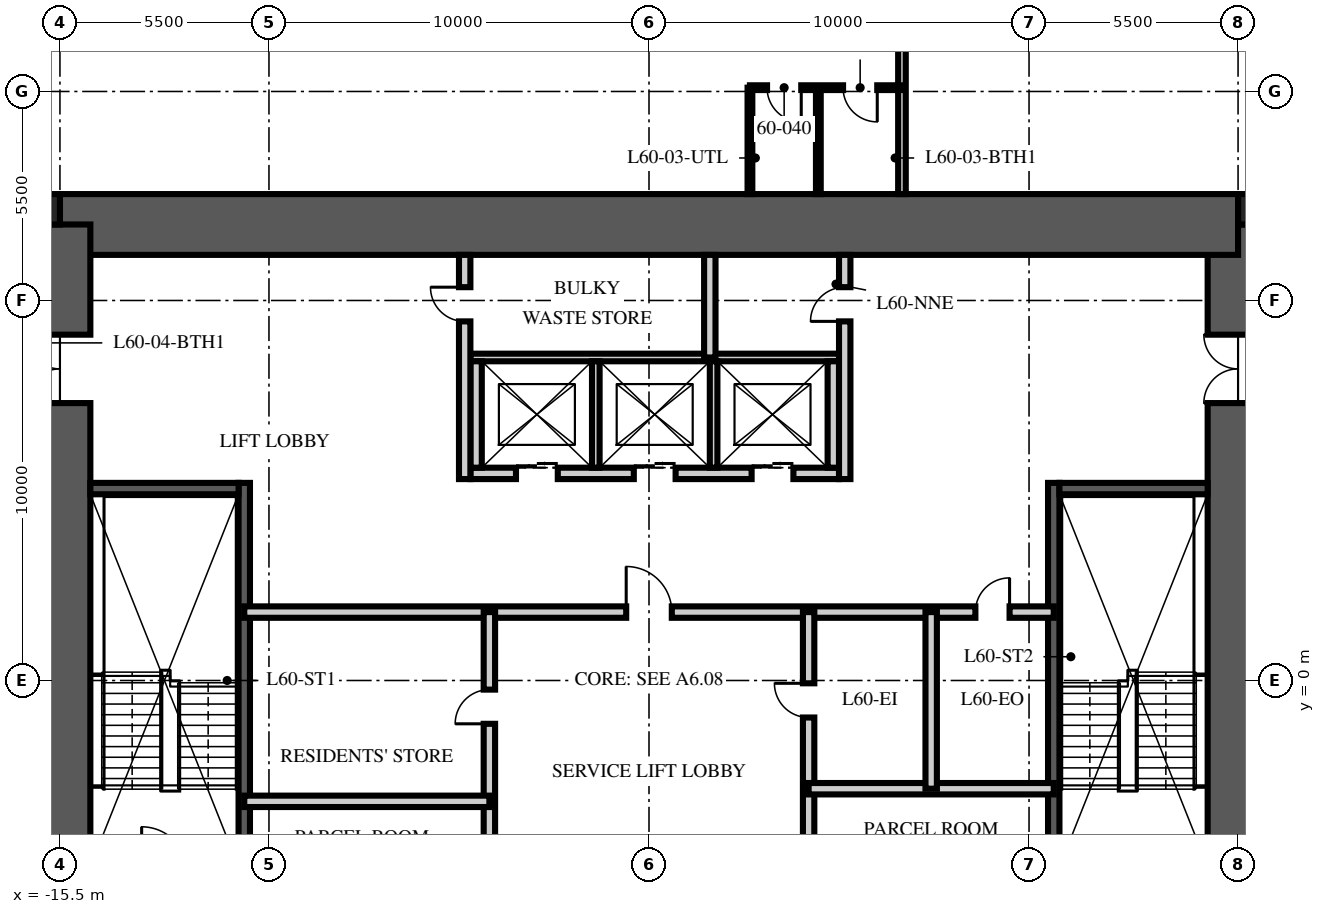
"""IFC4 building model, lengths in metres.
Left out: names, types, materials, properties, quantities, classifications, styles, units other than length and angle.
Written with IfcOpenShell. Run it as: python <this file> out.ifc"""

import sys

from ifc_helpers import new_model, si_unit, direction, frame, frame_2d, origin, origin_2d, place, context, subcontext, project, spatial, rectangle, extrude, element, fill, save


model = new_model("IFC4")
c1 = context("Model", 3, precision=1e-05, world=origin(), true_north=direction((0.0, 1.0)))
c2 = subcontext(c1, "Body", "Model", "MODEL_VIEW")
j1 = project(units=[si_unit("LENGTHUNIT", "METRE"), si_unit("PLANEANGLEUNIT", "RADIAN")], contexts=[c1])
p1 = place(None, origin())
s1 = spatial("IfcSite", under=j1, at=p1, CompositionType="ELEMENT")
p2 = place(p1, origin())
s2 = spatial("IfcBuilding", under=s1, at=p2, CompositionType="ELEMENT")
p3 = place(p2, frame((0.0, 0.0, 240.75)))
s3 = spatial("IfcBuildingStorey", under=s2, at=p3, CompositionType="ELEMENT", Elevation=240.75)
p4 = place(p3, frame((15.5, -12.0, -0.25), z_axis=(0.0, 0.0, 1.0), x_axis=(0.0, 1.0, 0.0)))
e1 = element("IfcWall", 1, at=p4, inside=s3, PredefinedType="SHEAR", context=c2, shape_type="SweptSolid", body=[
    extrude(rectangle(XDim=24.0, YDim=1.6, at=frame_2d((12.0, 0.0))), origin(), (0.0, 0.0, 1.0), 3.75),
])
p5 = place(p4, frame((3.2, 0.0, 0.25)))
e2 = element("IfcOpeningElement", 2, at=p5, cuts=e1, PredefinedType="OPENING", context=c2, shape_type="SweptSolid", body=[
    extrude(rectangle(XDim=1.2, YDim=2.1, at=frame_2d((0.6, 1.05))), frame((0.0, 0.81, 0.0), z_axis=(0.0, -1.0, 0.0), x_axis=(1.0, 0.0, 0.0)), (0.0, 0.0, 1.0), 1.62),
])
p6 = place(p4, frame((19.3, 0.0, 0.25)))
e3 = element("IfcOpeningElement", 3, at=p6, cuts=e1, PredefinedType="OPENING", context=c2, shape_type="SweptSolid", body=[
    extrude(rectangle(XDim=1.8, YDim=2.1, at=frame_2d((0.9, 1.05))), frame((0.0, 0.81, 0.0), z_axis=(0.0, -1.0, 0.0), x_axis=(1.0, 0.0, 0.0)), (0.0, 0.0, 1.0), 1.62),
])
p7 = place(p3, frame((-15.5, 12.0, -0.25), z_axis=(0.0, 0.0, 1.0), x_axis=(1.0, 0.0, 0.0)))
e4 = element("IfcWall", 4, at=p7, inside=s3, PredefinedType="SHEAR", context=c2, shape_type="SweptSolid", body=[
    extrude(rectangle(XDim=31.0, YDim=1.6, at=frame_2d((15.5, 0.0))), origin(), (0.0, 0.0, 1.0), 3.75),
])
p8 = place(p3, frame((-15.5, -12.0, -0.25), z_axis=(0.0, 0.0, 1.0), x_axis=(0.0, 1.0, 0.0)))
e5 = element("IfcWall", 5, at=p8, inside=s3, PredefinedType="SHEAR", context=c2, shape_type="SweptSolid", body=[
    extrude(rectangle(XDim=24.0, YDim=1.6, at=frame_2d((12.0, 0.0))), origin(), (0.0, 0.0, 1.0), 3.75),
])
p9 = place(p8, frame((3.2, 0.0, 0.25)))
e6 = element("IfcOpeningElement", 6, at=p9, cuts=e5, PredefinedType="OPENING", context=c2, shape_type="SweptSolid", body=[
    extrude(rectangle(XDim=1.2, YDim=2.1, at=frame_2d((0.6, 1.05))), frame((0.0, 0.81, 0.0), z_axis=(0.0, -1.0, 0.0), x_axis=(1.0, 0.0, 0.0)), (0.0, 0.0, 1.0), 1.62),
])
p10 = place(p8, frame((19.3, 0.0, 0.25)))
e7 = element("IfcOpeningElement", 7, at=p10, cuts=e5, PredefinedType="OPENING", context=c2, shape_type="SweptSolid", body=[
    extrude(rectangle(XDim=1.8, YDim=2.1, at=frame_2d((0.9, 1.05))), frame((0.0, 0.81, 0.0), z_axis=(0.0, -1.0, 0.0), x_axis=(1.0, 0.0, 0.0)), (0.0, 0.0, 1.0), 1.62),
])
for number, where, z_axis, x_axis in (
    (8, (15.9, 12.4, -0.25), (0.0, 0.0, 1.0), (1.0, 0.0, 0.0)),
    (9, (-15.9, 12.4, -0.25), (0.0, 0.0, 1.0), (1.0, 0.0, 0.0)),
):
    element("IfcColumn", number, at=place(p3, frame(where, z_axis=z_axis, x_axis=x_axis)), inside=s3, PredefinedType="COLUMN", context=c2, shape_type="SweptSolid", body=[
        extrude(rectangle(XDim=0.8, YDim=0.8, at=origin_2d()), origin(), (0.0, 0.0, 1.0), 3.75),
    ])
p11 = place(p3, frame((-10.65, -4.9, 0.0), z_axis=(0.0, 0.0, 1.0), x_axis=(0.0, 1.0, 0.0)))
e10 = element("IfcWall", 10, at=p11, inside=s3, PredefinedType="SOLIDWALL", context=c2, shape_type="SweptSolid", body=[
    extrude(rectangle(XDim=10.1, YDim=0.3, at=frame_2d((5.05, 0.0))), origin(), (0.0, 0.0, 1.0), 3.5),
])
p12 = place(p3, frame((-14.7, 5.05, 0.0), z_axis=(0.0, 0.0, 1.0), x_axis=(1.0, 0.0, 0.0)))
e11 = element("IfcWall", 11, at=p12, inside=s3, PredefinedType="SOLIDWALL", context=c2, shape_type="SweptSolid", body=[
    extrude(rectangle(XDim=3.9, YDim=0.3, at=frame_2d((1.95, 0.0))), origin(), (0.0, 0.0, 1.0), 3.5),
])
p13 = place(p3, frame((10.65, -4.9, 0.0), z_axis=(0.0, 0.0, 1.0), x_axis=(0.0, 1.0, 0.0)))
e12 = element("IfcWall", 12, at=p13, inside=s3, PredefinedType="SOLIDWALL", context=c2, shape_type="SweptSolid", body=[
    extrude(rectangle(XDim=10.1, YDim=0.3, at=frame_2d((5.05, 0.0))), origin(), (0.0, 0.0, 1.0), 3.5),
])
p14 = place(p3, frame((14.7, 5.05, 0.0), z_axis=(0.0, 0.0, 1.0), x_axis=(-1.0, 0.0, 0.0)))
e13 = element("IfcWall", 13, at=p14, inside=s3, PredefinedType="SOLIDWALL", context=c2, shape_type="SweptSolid", body=[
    extrude(rectangle(XDim=3.9, YDim=0.3, at=frame_2d((1.95, 0.0))), origin(), (0.0, 0.0, 1.0), 3.5),
])
p15 = place(p3, frame((-4.7, 5.45, 0.0), z_axis=(0.0, 0.0, 1.0), x_axis=(1.0, 0.0, 0.0)))
e14 = element("IfcWall", 14, at=p15, inside=s3, PredefinedType="PARTITIONING", context=c2, shape_type="SweptSolid", body=[
    extrude(rectangle(XDim=9.7, YDim=0.3, at=frame_2d((4.85, 0.0))), origin(), (0.0, 0.0, 1.0), 3.5),
])
p16 = place(p15, frame((1.2, 0.0, 0.0)))
e15 = element("IfcOpeningElement", 15, at=p16, cuts=e14, PredefinedType="OPENING", context=c2, shape_type="SweptSolid", body=[
    extrude(rectangle(XDim=1.1, YDim=2.1, at=frame_2d((0.55, 1.05))), frame((0.0, 0.16, 0.0), z_axis=(0.0, -1.0, 0.0), x_axis=(1.0, 0.0, 0.0)), (0.0, 0.0, 1.0), 0.32),
])
p17 = place(p15, frame((4.3, 0.0, 0.0)))
e16 = element("IfcOpeningElement", 16, at=p17, cuts=e14, PredefinedType="OPENING", context=c2, shape_type="SweptSolid", body=[
    extrude(rectangle(XDim=1.1, YDim=2.1, at=frame_2d((0.55, 1.05))), frame((0.0, 0.16, 0.0), z_axis=(0.0, -1.0, 0.0), x_axis=(1.0, 0.0, 0.0)), (0.0, 0.0, 1.0), 0.32),
])
p18 = place(p15, frame((7.4, 0.0, 0.0)))
e17 = element("IfcOpeningElement", 17, at=p18, cuts=e14, PredefinedType="OPENING", context=c2, shape_type="SweptSolid", body=[
    extrude(rectangle(XDim=1.1, YDim=2.1, at=frame_2d((0.55, 1.05))), frame((0.0, 0.16, 0.0), z_axis=(0.0, -1.0, 0.0), x_axis=(1.0, 0.0, 0.0)), (0.0, 0.0, 1.0), 0.32),
])
p19 = place(p3, frame((-4.7, 8.5, 0.0), z_axis=(0.0, 0.0, 1.0), x_axis=(1.0, 0.0, 0.0)))
e18 = element("IfcWall", 18, at=p19, inside=s3, PredefinedType="PARTITIONING", context=c2, shape_type="SweptSolid", body=[
    extrude(rectangle(XDim=9.7, YDim=0.2, at=frame_2d((4.85, 0.0))), origin(), (0.0, 0.0, 1.0), 3.5),
])
for number, where, z_axis, x_axis in (
    (19, (-4.55, 5.6, 0.0), (0.0, 0.0, 1.0), (0.0, 1.0, 0.0)),
    (20, (4.85, 5.6, 0.0), (0.0, 0.0, 1.0), (0.0, 1.0, 0.0)),
):
    element("IfcWall", number, at=place(p3, frame(where, z_axis=z_axis, x_axis=x_axis)), inside=s3, PredefinedType="PARTITIONING", context=c2, shape_type="SweptSolid", body=[
        extrude(rectangle(XDim=2.8, YDim=0.3, at=frame_2d((1.4, 0.0))), origin(), (0.0, 0.0, 1.0), 3.5),
    ])
for number, where, z_axis, x_axis in (
    (21, (-1.4, 5.6, 0.0), (0.0, 0.0, 1.0), (0.0, 1.0, 0.0)),
    (22, (1.7, 5.6, 0.0), (0.0, 0.0, 1.0), (0.0, 1.0, 0.0)),
):
    element("IfcWall", number, at=place(p3, frame(where, z_axis=z_axis, x_axis=x_axis)), inside=s3, PredefinedType="PARTITIONING", context=c2, shape_type="SweptSolid", body=[
        extrude(rectangle(XDim=2.8, YDim=0.2, at=frame_2d((1.4, 0.0))), origin(), (0.0, 0.0, 1.0), 3.5),
    ])
p20 = place(p3, frame((-10.65, 1.8, 0.0), z_axis=(0.0, 0.0, 1.0), x_axis=(1.0, 0.0, 0.0)))
e23 = element("IfcWall", 23, at=p20, inside=s3, PredefinedType="PARTITIONING", context=c2, shape_type="SweptSolid", body=[
    extrude(rectangle(XDim=21.3, YDim=0.3, at=frame_2d((10.65, 0.0))), origin(), (0.0, 0.0, 1.0), 3.5),
])
p21 = place(p20, frame((10.05, 0.0, 0.0)))
e24 = element("IfcOpeningElement", 24, at=p21, cuts=e23, PredefinedType="OPENING", context=c2, shape_type="SweptSolid", body=[
    extrude(rectangle(XDim=1.2, YDim=2.1, at=frame_2d((0.6, 1.05))), frame((0.0, 0.16, 0.0), z_axis=(0.0, -1.0, 0.0), x_axis=(1.0, 0.0, 0.0)), (0.0, 0.0, 1.0), 0.32),
])
p22 = place(p20, frame((19.238, 0.0, 0.0)))
e25 = element("IfcOpeningElement", 25, at=p22, cuts=e23, PredefinedType="OPENING", context=c2, shape_type="SweptSolid", body=[
    extrude(rectangle(XDim=0.9, YDim=2.1, at=frame_2d((0.45, 1.05))), frame((0.0, 0.16, 0.0), z_axis=(0.0, -1.0, 0.0), x_axis=(1.0, 0.0, 0.0)), (0.0, 0.0, 1.0), 0.32),
])
p23 = place(p3, frame((-4.2, -6.65, 0.0), z_axis=(0.0, 0.0, 1.0), x_axis=(0.0, 1.0, 0.0)))
e26 = element("IfcWall", 26, at=p23, inside=s3, PredefinedType="PARTITIONING", context=c2, shape_type="SweptSolid", body=[
    extrude(rectangle(XDim=8.45, YDim=0.3, at=frame_2d((4.225, 0.0))), origin(), (0.0, 0.0, 1.0), 3.5),
])
p24 = place(p23, frame((1.285, 0.0, 0.0)))
e27 = element("IfcOpeningElement", 27, at=p24, cuts=e26, PredefinedType="OPENING", context=c2, shape_type="SweptSolid", body=[
    extrude(rectangle(XDim=0.9, YDim=2.1, at=frame_2d((0.45, 1.05))), frame((0.0, 0.16, 0.0), z_axis=(0.0, -1.0, 0.0), x_axis=(1.0, 0.0, 0.0)), (0.0, 0.0, 1.0), 0.32),
])
p25 = place(p23, frame((5.51, 0.0, 0.0)))
e28 = element("IfcOpeningElement", 28, at=p25, cuts=e26, PredefinedType="OPENING", context=c2, shape_type="SweptSolid", body=[
    extrude(rectangle(XDim=0.9, YDim=2.1, at=frame_2d((0.45, 1.05))), frame((0.0, 0.16, 0.0), z_axis=(0.0, -1.0, 0.0), x_axis=(1.0, 0.0, 0.0)), (0.0, 0.0, 1.0), 0.32),
])
p26 = place(p3, frame((4.2, -6.65, 0.0), z_axis=(0.0, 0.0, 1.0), x_axis=(0.0, 1.0, 0.0)))
e29 = element("IfcWall", 29, at=p26, inside=s3, PredefinedType="PARTITIONING", context=c2, shape_type="SweptSolid", body=[
    extrude(rectangle(XDim=8.45, YDim=0.3, at=frame_2d((4.225, 0.0))), origin(), (0.0, 0.0, 1.0), 3.5),
])
p27 = place(p26, frame((1.451, 0.0, 0.0)))
e30 = element("IfcOpeningElement", 30, at=p27, cuts=e29, PredefinedType="OPENING", context=c2, shape_type="SweptSolid", body=[
    extrude(rectangle(XDim=0.9, YDim=2.1, at=frame_2d((0.45, 1.05))), frame((0.0, 0.16, 0.0), z_axis=(0.0, -1.0, 0.0), x_axis=(1.0, 0.0, 0.0)), (0.0, 0.0, 1.0), 0.32),
])
p28 = place(p26, frame((5.676, 0.0, 0.0)))
e31 = element("IfcOpeningElement", 31, at=p28, cuts=e29, PredefinedType="OPENING", context=c2, shape_type="SweptSolid", body=[
    extrude(rectangle(XDim=0.9, YDim=2.1, at=frame_2d((0.45, 1.05))), frame((0.0, 0.16, 0.0), z_axis=(0.0, -1.0, 0.0), x_axis=(1.0, 0.0, 0.0)), (0.0, 0.0, 1.0), 0.32),
])
for number, where, z_axis, x_axis in (
    (32, (-10.65, -3.18, 0.0), (0.0, 0.0, 1.0), (1.0, 0.0, 0.0)),
    (33, (10.65, -2.848, 0.0), (0.0, 0.0, 1.0), (-1.0, 0.0, 0.0)),
):
    element("IfcWall", number, at=place(p3, frame(where, z_axis=z_axis, x_axis=x_axis)), inside=s3, PredefinedType="PARTITIONING", context=c2, shape_type="SweptSolid", body=[
        extrude(rectangle(XDim=6.45, YDim=0.3, at=frame_2d((3.225, 0.0))), origin(), (0.0, 0.0, 1.0), 3.5),
    ])
p29 = place(p3, frame((7.425, -2.848, 0.0), z_axis=(0.0, 0.0, 1.0), x_axis=(0.0, 1.0, 0.0)))
e34 = element("IfcWall", 34, at=p29, inside=s3, PredefinedType="PARTITIONING", context=c2, shape_type="SweptSolid", body=[
    extrude(rectangle(XDim=4.648, YDim=0.3, at=frame_2d((2.324, 0.0))), origin(), (0.0, 0.0, 1.0), 3.5),
])
p30 = place(p3, frame((-4.85, 5.3, 0.0), z_axis=(0.0, 0.0, 1.0), x_axis=(0.0, 1.0, 0.0)))
e35 = element("IfcWall", 35, at=p30, inside=s3, PredefinedType="PARTITIONING", context=c2, shape_type="SweptSolid", body=[
    extrude(rectangle(XDim=5.9, YDim=0.3, at=frame_2d((2.95, 0.0))), origin(), (0.0, 0.0, 1.0), 3.5),
])
p31 = place(p30, frame((4.15, 0.0, 0.0)))
e36 = element("IfcOpeningElement", 36, at=p31, cuts=e35, PredefinedType="OPENING", context=c2, shape_type="SweptSolid", body=[
    extrude(rectangle(XDim=0.9, YDim=2.1, at=frame_2d((0.45, 1.05))), frame((0.0, 0.16, 0.0), z_axis=(0.0, -1.0, 0.0), x_axis=(1.0, 0.0, 0.0)), (0.0, 0.0, 1.0), 0.32),
])
p32 = place(p3, frame((5.15, 5.3, 0.0), z_axis=(0.0, 0.0, 1.0), x_axis=(0.0, 1.0, 0.0)))
e37 = element("IfcWall", 37, at=p32, inside=s3, PredefinedType="PARTITIONING", context=c2, shape_type="SweptSolid", body=[
    extrude(rectangle(XDim=5.9, YDim=0.3, at=frame_2d((2.95, 0.0))), origin(), (0.0, 0.0, 1.0), 3.5),
])
p33 = place(p32, frame((4.15, 0.0, 0.0)))
e38 = element("IfcOpeningElement", 38, at=p33, cuts=e37, PredefinedType="OPENING", context=c2, shape_type="SweptSolid", body=[
    extrude(rectangle(XDim=0.9, YDim=2.1, at=frame_2d((0.45, 1.05))), frame((0.0, 0.16, 0.0), z_axis=(0.0, -1.0, 0.0), x_axis=(1.0, 0.0, 0.0)), (0.0, 0.0, 1.0), 0.32),
])
p34 = place(p3, frame((1.6, 8.5, 0.0), z_axis=(0.0, 0.0, 1.0), x_axis=(0.0, 1.0, 0.0)))
e39 = element("IfcWall", 39, at=p34, inside=s3, PredefinedType="PARTITIONING", context=c2, shape_type="SweptSolid", body=[
    extrude(rectangle(XDim=2.7, YDim=0.3, at=frame_2d((1.35, 0.0))), origin(), (0.0, 0.0, 1.0), 3.5),
])
p35 = place(p3, frame((6.656, 12.8, 0.0), z_axis=(0.0, 0.0, 1.0), x_axis=(0.0, 1.0, 0.0)))
e40 = element("IfcWall", 40, at=p35, inside=s3, PredefinedType="PARTITIONING", context=c2, shape_type="SweptSolid", body=[
    extrude(rectangle(XDim=13.15, YDim=0.2, at=frame_2d((6.575, 0.0))), origin(), (0.0, 0.0, 1.0), 2.91),
])
p36 = place(p3, frame((6.656, 15.6, 0.0), z_axis=(0.0, 0.0, 1.0), x_axis=(-1.0, 0.0, 0.0)))
e41 = element("IfcWall", 41, at=p36, inside=s3, PredefinedType="PARTITIONING", context=c2, shape_type="SweptSolid", body=[
    extrude(rectangle(XDim=4.0, YDim=0.125, at=frame_2d((2.0, 0.0))), origin(), (0.0, 0.0, 1.0), 2.81),
])
p37 = place(p36, frame((0.65, 0.0, 0.0)))
e42 = element("IfcOpeningElement", 42, at=p37, cuts=e41, PredefinedType="OPENING", context=c2, shape_type="SweptSolid", body=[
    extrude(rectangle(XDim=0.9, YDim=2.1, at=frame_2d((0.45, 1.05))), frame((0.0, 0.073, 0.0), z_axis=(0.0, -1.0, 0.0), x_axis=(1.0, 0.0, 0.0)), (0.0, 0.0, 1.0), 0.145),
])
p38 = place(p36, frame((2.65, 0.0, 0.0)))
e43 = element("IfcOpeningElement", 43, at=p38, cuts=e41, PredefinedType="OPENING", context=c2, shape_type="SweptSolid", body=[
    extrude(rectangle(XDim=0.9, YDim=2.1, at=frame_2d((0.45, 1.05))), frame((0.0, 0.073, 0.0), z_axis=(0.0, -1.0, 0.0), x_axis=(1.0, 0.0, 0.0)), (0.0, 0.0, 1.0), 0.145),
])
for number, where, z_axis, x_axis in (
    (44, (4.456, 12.8, 0.0), (0.0, 0.0, 1.0), (0.0, 1.0, 0.0)),
    (45, (2.656, 12.8, 0.0), (0.0, 0.0, 1.0), (0.0, 1.0, 0.0)),
):
    element("IfcWall", number, at=place(p3, frame(where, z_axis=z_axis, x_axis=x_axis)), inside=s3, PredefinedType="PARTITIONING", context=c2, shape_type="SweptSolid", body=[
        extrude(rectangle(XDim=2.8, YDim=0.125, at=frame_2d((1.4, 0.0))), origin(), (0.0, 0.0, 1.0), 3.5),
    ])
p39 = place(p10, origin())
e46 = element("IfcDoor", 46, at=p39, inside=s3, OperationType="DOUBLE_DOOR_SINGLE_SWING", PredefinedType="DOOR", context=c2, shape_type="SweptSolid", body=[
    extrude(rectangle(XDim=1.8, YDim=2.1, at=frame_2d((0.9, 1.05))), frame((0.0, 0.025, 0.0), z_axis=(0.0, -1.0, 0.0), x_axis=(1.0, 0.0, 0.0)), (0.0, 0.0, 1.0), 0.05),
])
fill(e7, e46)
p40 = place(p6, origin())
e47 = element("IfcDoor", 47, at=p40, inside=s3, OperationType="DOUBLE_DOOR_SINGLE_SWING", PredefinedType="DOOR", context=c2, shape_type="SweptSolid", body=[
    extrude(rectangle(XDim=1.8, YDim=2.1, at=frame_2d((0.9, 1.05))), frame((0.0, 0.025, 0.0), z_axis=(0.0, -1.0, 0.0), x_axis=(1.0, 0.0, 0.0)), (0.0, 0.0, 1.0), 0.05),
])
fill(e3, e47)
p41 = place(p16, origin())
e48 = element("IfcDoor", 48, at=p41, inside=s3, OperationType="DOUBLE_DOOR_SLIDING", PredefinedType="DOOR", context=c2, shape_type="SweptSolid", body=[
    extrude(rectangle(XDim=1.1, YDim=2.1, at=frame_2d((0.55, 1.05))), frame((0.0, 0.025, 0.0), z_axis=(0.0, -1.0, 0.0), x_axis=(1.0, 0.0, 0.0)), (0.0, 0.0, 1.0), 0.05),
])
fill(e15, e48)
p42 = place(p17, origin())
e49 = element("IfcDoor", 49, at=p42, inside=s3, OperationType="DOUBLE_DOOR_SLIDING", PredefinedType="DOOR", context=c2, shape_type="SweptSolid", body=[
    extrude(rectangle(XDim=1.1, YDim=2.1, at=frame_2d((0.55, 1.05))), frame((0.0, 0.025, 0.0), z_axis=(0.0, -1.0, 0.0), x_axis=(1.0, 0.0, 0.0)), (0.0, 0.0, 1.0), 0.05),
])
fill(e16, e49)
p43 = place(p18, origin())
e50 = element("IfcDoor", 50, at=p43, inside=s3, OperationType="DOUBLE_DOOR_SLIDING", PredefinedType="DOOR", context=c2, shape_type="SweptSolid", body=[
    extrude(rectangle(XDim=1.1, YDim=2.1, at=frame_2d((0.55, 1.05))), frame((0.0, 0.025, 0.0), z_axis=(0.0, -1.0, 0.0), x_axis=(1.0, 0.0, 0.0)), (0.0, 0.0, 1.0), 0.05),
])
fill(e17, e50)
p44 = place(p21, origin())
e51 = element("IfcDoor", 51, at=p44, inside=s3, OperationType="SINGLE_SWING_LEFT", PredefinedType="DOOR", context=c2, shape_type="SweptSolid", body=[
    extrude(rectangle(XDim=1.2, YDim=2.1, at=frame_2d((0.6, 1.05))), frame((0.0, 0.025, 0.0), z_axis=(0.0, -1.0, 0.0), x_axis=(1.0, 0.0, 0.0)), (0.0, 0.0, 1.0), 0.05),
])
fill(e24, e51)
p45 = place(p25, origin())
e52 = element("IfcDoor", 52, at=p45, inside=s3, OperationType="SINGLE_SWING_LEFT", PredefinedType="DOOR", context=c2, shape_type="SweptSolid", body=[
    extrude(rectangle(XDim=0.9, YDim=2.1, at=frame_2d((0.45, 1.05))), frame((0.0, 0.025, 0.0), z_axis=(0.0, -1.0, 0.0), x_axis=(1.0, 0.0, 0.0)), (0.0, 0.0, 1.0), 0.05),
])
fill(e28, e52)
p46 = place(p28, origin())
e53 = element("IfcDoor", 53, at=p46, inside=s3, OperationType="SINGLE_SWING_RIGHT", PredefinedType="DOOR", context=c2, shape_type="SweptSolid", body=[
    extrude(rectangle(XDim=0.9, YDim=2.1, at=frame_2d((0.45, 1.05))), frame((0.0, 0.025, 0.0), z_axis=(0.0, -1.0, 0.0), x_axis=(1.0, 0.0, 0.0)), (0.0, 0.0, 1.0), 0.05),
])
fill(e31, e53)
p47 = place(p22, origin())
e54 = element("IfcDoor", 54, at=p47, inside=s3, OperationType="SINGLE_SWING_RIGHT", PredefinedType="DOOR", context=c2, shape_type="SweptSolid", body=[
    extrude(rectangle(XDim=0.9, YDim=2.1, at=frame_2d((0.45, 1.05))), frame((0.0, 0.025, 0.0), z_axis=(0.0, -1.0, 0.0), x_axis=(1.0, 0.0, 0.0)), (0.0, 0.0, 1.0), 0.05),
])
fill(e25, e54)
p48 = place(p31, origin())
e55 = element("IfcDoor", 55, at=p48, inside=s3, OperationType="SINGLE_SWING_RIGHT", PredefinedType="DOOR", context=c2, shape_type="SweptSolid", body=[
    extrude(rectangle(XDim=0.9, YDim=2.1, at=frame_2d((0.45, 1.05))), frame((0.0, 0.025, 0.0), z_axis=(0.0, -1.0, 0.0), x_axis=(1.0, 0.0, 0.0)), (0.0, 0.0, 1.0), 0.05),
])
fill(e36, e55)
p49 = place(p33, origin())
e56 = element("IfcDoor", 56, at=p49, inside=s3, OperationType="SINGLE_SWING_LEFT", PredefinedType="DOOR", context=c2, shape_type="SweptSolid", body=[
    extrude(rectangle(XDim=0.9, YDim=2.1, at=frame_2d((0.45, 1.05))), frame((0.0, 0.025, 0.0), z_axis=(0.0, -1.0, 0.0), x_axis=(1.0, 0.0, 0.0)), (0.0, 0.0, 1.0), 0.05),
])
fill(e38, e56)
p50 = place(p37, origin())
e57 = element("IfcDoor", 57, at=p50, inside=s3, OperationType="SINGLE_SWING_LEFT", PredefinedType="DOOR", context=c2, shape_type="SweptSolid", body=[
    extrude(rectangle(XDim=0.9, YDim=2.1, at=frame_2d((0.45, 1.05))), frame((0.0, 0.025, 0.0), z_axis=(0.0, -1.0, 0.0), x_axis=(1.0, 0.0, 0.0)), (0.0, 0.0, 1.0), 0.05),
])
fill(e42, e57)
p51 = place(p38, origin())
e58 = element("IfcDoor", 58, at=p51, inside=s3, OperationType="SINGLE_SWING_LEFT", PredefinedType="DOOR", context=c2, shape_type="SweptSolid", body=[
    extrude(rectangle(XDim=0.9, YDim=2.1, at=frame_2d((0.45, 1.05))), frame((0.0, 0.025, 0.0), z_axis=(0.0, -1.0, 0.0), x_axis=(1.0, 0.0, 0.0)), (0.0, 0.0, 1.0), 0.05),
])
fill(e43, e58)
save(model, sys.argv[1])
